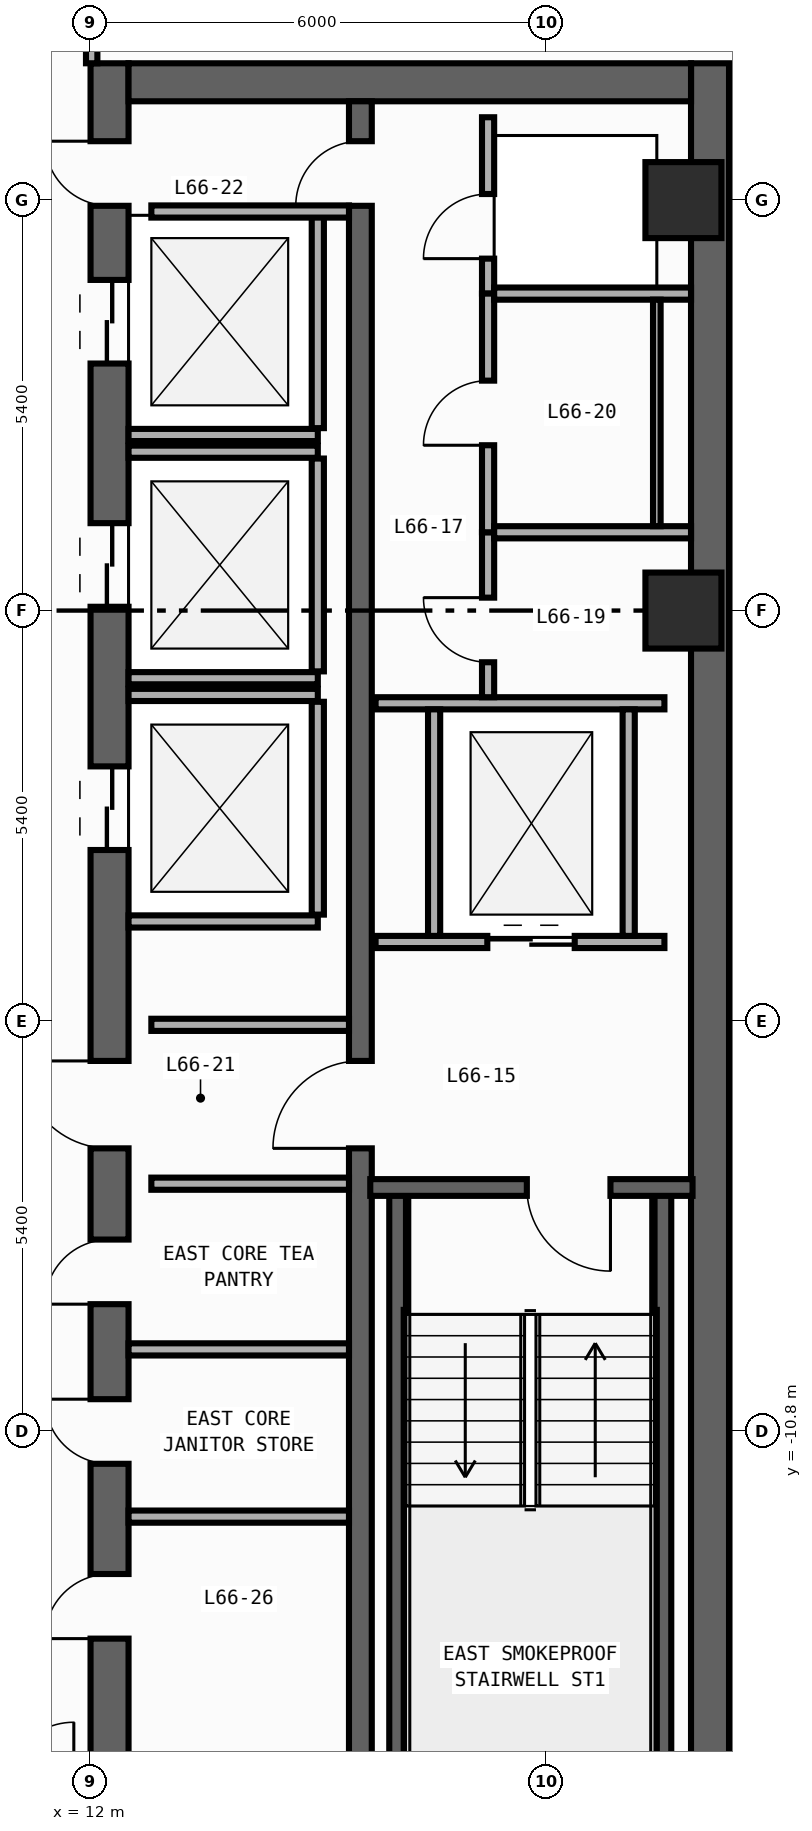
"""IFC4 building model, lengths in metres.
Left out: names, types, materials, properties, quantities, classifications, styles, units other than length and angle.
Written with IfcOpenShell. Run it as: python <this file> out.ifc"""

import sys

from ifc_helpers import new_model, si_unit, direction, frame, frame_2d, origin, origin_2d, place, context, subcontext, project, spatial, rectangle, circle, extrude, element, fill, save


model = new_model("IFC4")
c1 = context("Model", 3, precision=1e-05, world=origin(), true_north=direction((0.0, 1.0)))
c2 = subcontext(c1, "Body", "Model", "MODEL_VIEW")
j1 = project(units=[si_unit("LENGTHUNIT", "METRE"), si_unit("PLANEANGLEUNIT", "RADIAN")], contexts=[c1])
p1 = place(None, origin())
s1 = spatial("IfcSite", under=j1, at=p1, CompositionType="ELEMENT")
p2 = place(p1, origin())
s2 = spatial("IfcBuilding", under=s1, at=p2, CompositionType="ELEMENT")
p3 = place(p2, frame((0.0, 0.0, 277.6)))
s3 = spatial("IfcBuildingStorey", under=s2, at=p3, CompositionType="ELEMENT", Elevation=277.6)
p4 = place(p3, frame((12.25, -19.8, 0.0), z_axis=(0.0, 0.0, 1.0), x_axis=(0.0, 1.0, 0.0)))
e1 = element("IfcWall", 1, at=p4, inside=s3, PredefinedType="SHEAR", context=c2, shape_type="SweptSolid", body=[
    extrude(rectangle(XDim=27.0, YDim=0.5, at=frame_2d((13.5, 0.0))), origin(), (0.0, 0.0, 1.0), 3.54),
])
p5 = place(p4, frame((23.05, 0.0, 0.0)))
e2 = element("IfcOpeningElement", 2, at=p5, cuts=e1, PredefinedType="OPENING", context=c2, shape_type="SweptSolid", body=[
    extrude(rectangle(XDim=1.1, YDim=2.2, at=frame_2d((0.55, 1.1))), frame((0.0, 0.26, 0.0), z_axis=(0.0, -1.0, 0.0), x_axis=(1.0, 0.0, 0.0)), (0.0, 0.0, 1.0), 0.52),
])
p6 = place(p4, frame((19.85, 0.0, 0.0)))
e3 = element("IfcOpeningElement", 3, at=p6, cuts=e1, PredefinedType="OPENING", context=c2, shape_type="SweptSolid", body=[
    extrude(rectangle(XDim=1.1, YDim=2.2, at=frame_2d((0.55, 1.1))), frame((0.0, 0.26, 0.0), z_axis=(0.0, -1.0, 0.0), x_axis=(1.0, 0.0, 0.0)), (0.0, 0.0, 1.0), 0.52),
])
p7 = place(p4, frame((16.65, 0.0, 0.0)))
e4 = element("IfcOpeningElement", 4, at=p7, cuts=e1, PredefinedType="OPENING", context=c2, shape_type="SweptSolid", body=[
    extrude(rectangle(XDim=1.1, YDim=2.2, at=frame_2d((0.55, 1.1))), frame((0.0, 0.26, 0.0), z_axis=(0.0, -1.0, 0.0), x_axis=(1.0, 0.0, 0.0)), (0.0, 0.0, 1.0), 0.52),
])
p8 = place(p4, frame((6.275, 0.0, 0.0)))
e5 = element("IfcOpeningElement", 5, at=p8, cuts=e1, PredefinedType="OPENING", context=c2, shape_type="SweptSolid", body=[
    extrude(rectangle(XDim=0.85, YDim=2.1, at=frame_2d((0.425, 1.05))), frame((0.0, 0.26, 0.0), z_axis=(0.0, -1.0, 0.0), x_axis=(1.0, 0.0, 0.0)), (0.0, 0.0, 1.0), 0.52),
])
p9 = place(p4, frame((8.575, 0.0, 0.0)))
e6 = element("IfcOpeningElement", 6, at=p9, cuts=e1, PredefinedType="OPENING", context=c2, shape_type="SweptSolid", body=[
    extrude(rectangle(XDim=0.85, YDim=2.1, at=frame_2d((0.425, 1.05))), frame((0.0, 0.26, 0.0), z_axis=(0.0, -1.0, 0.0), x_axis=(1.0, 0.0, 0.0)), (0.0, 0.0, 1.0), 0.52),
])
p10 = place(p4, frame((10.675, 0.0, 0.0)))
e7 = element("IfcOpeningElement", 7, at=p10, cuts=e1, PredefinedType="OPENING", context=c2, shape_type="SweptSolid", body=[
    extrude(rectangle(XDim=0.85, YDim=2.1, at=frame_2d((0.425, 1.05))), frame((0.0, 0.26, 0.0), z_axis=(0.0, -1.0, 0.0), x_axis=(1.0, 0.0, 0.0)), (0.0, 0.0, 1.0), 0.52),
])
p11 = place(p4, frame((12.725, 0.0, 0.0)))
e8 = element("IfcOpeningElement", 8, at=p11, cuts=e1, PredefinedType="OPENING", context=c2, shape_type="SweptSolid", body=[
    extrude(rectangle(XDim=1.15, YDim=2.2, at=frame_2d((0.575, 1.1))), frame((0.0, 0.26, 0.0), z_axis=(0.0, -1.0, 0.0), x_axis=(1.0, 0.0, 0.0)), (0.0, 0.0, 1.0), 0.52),
])
p12 = place(p4, frame((25.125, 0.0, 0.0)))
e9 = element("IfcOpeningElement", 9, at=p12, cuts=e1, PredefinedType="OPENING", context=c2, shape_type="SweptSolid", body=[
    extrude(rectangle(XDim=0.85, YDim=2.1, at=frame_2d((0.425, 1.05))), frame((0.0, 0.26, 0.0), z_axis=(0.0, -1.0, 0.0), x_axis=(1.0, 0.0, 0.0)), (0.0, 0.0, 1.0), 0.52),
])
p13 = place(p3, frame((20.15, -19.8, 0.0), z_axis=(0.0, 0.0, 1.0), x_axis=(0.0, 1.0, 0.0)))
e10 = element("IfcWall", 10, at=p13, inside=s3, PredefinedType="SHEAR", context=c2, shape_type="SweptSolid", body=[
    extrude(rectangle(XDim=27.0, YDim=0.5, at=frame_2d((13.5, 0.0))), origin(), (0.0, 0.0, 1.0), 3.54),
])
p14 = place(p3, frame((12.5, 6.95, 0.0), z_axis=(0.0, 0.0, 1.0), x_axis=(1.0, 0.0, 0.0)))
e11 = element("IfcWall", 11, at=p14, inside=s3, PredefinedType="SHEAR", context=c2, shape_type="SweptSolid", body=[
    extrude(rectangle(XDim=7.4, YDim=0.5, at=frame_2d((3.7, 0.0))), origin(), (0.0, 0.0, 1.0), 3.54),
])
p15 = place(p3, frame((15.55, -19.3, 0.0), z_axis=(0.0, 0.0, 1.0), x_axis=(0.0, 1.0, 0.0)))
e12 = element("IfcWall", 12, at=p15, inside=s3, PredefinedType="SHEAR", context=c2, shape_type="SweptSolid", body=[
    extrude(rectangle(XDim=26.0, YDim=0.3, at=frame_2d((13.0, 0.0))), origin(), (0.0, 0.0, 1.0), 3.54),
])
p16 = place(p15, frame((12.225, 0.0, 0.0)))
e13 = element("IfcOpeningElement", 13, at=p16, cuts=e12, PredefinedType="OPENING", context=c2, shape_type="SweptSolid", body=[
    extrude(rectangle(XDim=1.15, YDim=2.2, at=frame_2d((0.575, 1.1))), frame((0.0, 0.16, 0.0), z_axis=(0.0, -1.0, 0.0), x_axis=(1.0, 0.0, 0.0)), (0.0, 0.0, 1.0), 0.32),
])
p17 = place(p15, frame((24.625, 0.0, 0.0)))
e14 = element("IfcOpeningElement", 14, at=p17, cuts=e12, PredefinedType="OPENING", context=c2, shape_type="SweptSolid", body=[
    extrude(rectangle(XDim=0.85, YDim=2.1, at=frame_2d((0.425, 1.05))), frame((0.0, 0.16, 0.0), z_axis=(0.0, -1.0, 0.0), x_axis=(1.0, 0.0, 0.0)), (0.0, 0.0, 1.0), 0.32),
])
for number, where, z_axis, x_axis in (
    (15, (16.04, -19.01, 0.0), (0.0, 0.0, 1.0), (0.0, 1.0, 0.0)),
    (16, (19.53, -19.01, 0.0), (0.0, 0.0, 1.0), (0.0, 1.0, 0.0)),
):
    element("IfcWall", number, at=place(p3, frame(where, z_axis=z_axis, x_axis=x_axis)), inside=s3, PredefinedType="SHEAR", context=c2, shape_type="SweptSolid", body=[
        extrude(rectangle(XDim=11.42, YDim=0.22, at=frame_2d((5.71, 0.0))), origin(), (0.0, 0.0, 1.0), 3.54),
    ])
p18 = place(p3, frame((19.92, -7.59, 0.0), z_axis=(0.0, 0.0, 1.0), x_axis=(-1.0, 0.0, 0.0)))
e17 = element("IfcWall", 17, at=p18, inside=s3, PredefinedType="SHEAR", context=c2, shape_type="SweptSolid", body=[
    extrude(rectangle(XDim=4.24, YDim=0.22, at=frame_2d((2.12, 0.0))), origin(), (0.0, 0.0, 1.0), 3.54),
])
p19 = place(p18, frame((1.08, 0.0, 0.0)))
e18 = element("IfcOpeningElement", 18, at=p19, cuts=e17, PredefinedType="OPENING", context=c2, shape_type="SweptSolid", body=[
    extrude(rectangle(XDim=1.1, YDim=2.2, at=frame_2d((0.55, 1.1))), frame((0.0, 0.12, 0.0), z_axis=(0.0, -1.0, 0.0), x_axis=(1.0, 0.0, 0.0)), (0.0, 0.0, 1.0), 0.24),
])
for number, where, z_axis, x_axis in (
    (19, (19.8, 0.0, 0.0), (0.0, 0.0, 1.0), (1.0, 0.0, 0.0)),
    (20, (19.8, 5.4, 0.0), (0.0, 0.0, 1.0), (1.0, 0.0, 0.0)),
):
    element("IfcColumn", number, at=place(p3, frame(where, z_axis=z_axis, x_axis=x_axis)), inside=s3, PredefinedType="COLUMN", context=c2, shape_type="SweptSolid", body=[
        extrude(circle(Radius=0.5, at=origin_2d()), origin(), (0.0, 0.0, 1.0), 3.8),
    ])
p20 = place(p3, frame((12.5, 2.31, 0.0), z_axis=(0.0, 0.0, 1.0), x_axis=(1.0, 0.0, 0.0)))
e21 = element("IfcWall", 21, at=p20, inside=s3, PredefinedType="STANDARD", context=c2, shape_type="SweptSolid", body=[
    extrude(rectangle(XDim=2.49, YDim=0.16, at=frame_2d((1.245, 0.0))), origin(), (0.0, 0.0, 1.0), 3.54),
])
p21 = place(p3, frame((14.99, 2.4, 0.0), z_axis=(0.0, 0.0, 1.0), x_axis=(0.0, 1.0, 0.0)))
e22 = element("IfcWall", 22, at=p21, inside=s3, PredefinedType="STANDARD", context=c2, shape_type="SweptSolid", body=[
    extrude(rectangle(XDim=2.8, YDim=0.16, at=frame_2d((1.4, 0.0))), origin(), (0.0, 0.0, 1.0), 3.54),
])
for number, where, z_axis, x_axis in (
    (23, (12.5, -0.89, 0.0), (0.0, 0.0, 1.0), (1.0, 0.0, 0.0)),
    (24, (12.5, 2.09, 0.0), (0.0, 0.0, 1.0), (1.0, 0.0, 0.0)),
):
    element("IfcWall", number, at=place(p3, frame(where, z_axis=z_axis, x_axis=x_axis)), inside=s3, PredefinedType="STANDARD", context=c2, shape_type="SweptSolid", body=[
        extrude(rectangle(XDim=2.49, YDim=0.16, at=frame_2d((1.245, 0.0))), origin(), (0.0, 0.0, 1.0), 3.54),
    ])
p22 = place(p3, frame((14.99, -0.8, 0.0), z_axis=(0.0, 0.0, 1.0), x_axis=(0.0, 1.0, 0.0)))
e25 = element("IfcWall", 25, at=p22, inside=s3, PredefinedType="STANDARD", context=c2, shape_type="SweptSolid", body=[
    extrude(rectangle(XDim=2.8, YDim=0.16, at=frame_2d((1.4, 0.0))), origin(), (0.0, 0.0, 1.0), 3.54),
])
for number, where, z_axis, x_axis in (
    (26, (12.5, -4.09, 0.0), (0.0, 0.0, 1.0), (1.0, 0.0, 0.0)),
    (27, (12.5, -1.11, 0.0), (0.0, 0.0, 1.0), (1.0, 0.0, 0.0)),
):
    element("IfcWall", number, at=place(p3, frame(where, z_axis=z_axis, x_axis=x_axis)), inside=s3, PredefinedType="STANDARD", context=c2, shape_type="SweptSolid", body=[
        extrude(rectangle(XDim=2.49, YDim=0.16, at=frame_2d((1.245, 0.0))), origin(), (0.0, 0.0, 1.0), 3.54),
    ])
p23 = place(p3, frame((14.99, -4.0, 0.0), z_axis=(0.0, 0.0, 1.0), x_axis=(0.0, 1.0, 0.0)))
e28 = element("IfcWall", 28, at=p23, inside=s3, PredefinedType="STANDARD", context=c2, shape_type="SweptSolid", body=[
    extrude(rectangle(XDim=2.8, YDim=0.16, at=frame_2d((1.4, 0.0))), origin(), (0.0, 0.0, 1.0), 3.54),
])
p24 = place(p3, frame((15.75, -4.36, 0.0), z_axis=(0.0, 0.0, 1.0), x_axis=(1.0, 0.0, 0.0)))
e29 = element("IfcWall", 29, at=p24, inside=s3, PredefinedType="STANDARD", context=c2, shape_type="SweptSolid", body=[
    extrude(rectangle(XDim=3.8, YDim=0.16, at=frame_2d((1.9, 0.0))), origin(), (0.0, 0.0, 1.0), 3.54),
])
p25 = place(p24, frame((1.47, 0.0, 0.0)))
e30 = element("IfcOpeningElement", 30, at=p25, cuts=e29, PredefinedType="OPENING", context=c2, shape_type="SweptSolid", body=[
    extrude(rectangle(XDim=1.15, YDim=2.2, at=frame_2d((0.575, 1.1))), frame((0.0, 0.09, 0.0), z_axis=(0.0, -1.0, 0.0), x_axis=(1.0, 0.0, 0.0)), (0.0, 0.0, 1.0), 0.18),
])
p26 = place(p3, frame((15.75, -1.22, 0.0), z_axis=(0.0, 0.0, 1.0), x_axis=(1.0, 0.0, 0.0)))
e31 = element("IfcWall", 31, at=p26, inside=s3, PredefinedType="STANDARD", context=c2, shape_type="SweptSolid", body=[
    extrude(rectangle(XDim=3.8, YDim=0.16, at=frame_2d((1.9, 0.0))), origin(), (0.0, 0.0, 1.0), 3.54),
])
for number, where, z_axis, x_axis in (
    (32, (16.52, -4.28, 0.0), (0.0, 0.0, 1.0), (0.0, 1.0, 0.0)),
    (33, (19.08, -4.28, 0.0), (0.0, 0.0, 1.0), (0.0, 1.0, 0.0)),
):
    element("IfcWall", number, at=place(p3, frame(where, z_axis=z_axis, x_axis=x_axis)), inside=s3, PredefinedType="STANDARD", context=c2, shape_type="SweptSolid", body=[
        extrude(rectangle(XDim=2.98, YDim=0.16, at=frame_2d((1.49, 0.0))), origin(), (0.0, 0.0, 1.0), 3.54),
    ])
for number, where, z_axis, x_axis in (
    (34, (12.8, -5.45, 0.0), (0.0, 0.0, 1.0), (1.0, 0.0, 0.0)),
    (35, (12.8, -7.54, 0.0), (0.0, 0.0, 1.0), (1.0, 0.0, 0.0)),
    (36, (12.8, 5.25, 0.0), (0.0, 0.0, 1.0), (1.0, 0.0, 0.0)),
):
    element("IfcWall", number, at=place(p3, frame(where, z_axis=z_axis, x_axis=x_axis)), inside=s3, PredefinedType="STANDARD", context=c2, shape_type="SweptSolid", body=[
        extrude(rectangle(XDim=2.6, YDim=0.16, at=frame_2d((1.3, 0.0))), origin(), (0.0, 0.0, 1.0), 3.54),
    ])
p27 = place(p3, frame((17.23, 4.17, 0.0), z_axis=(0.0, 0.0, 1.0), x_axis=(0.0, 1.0, 0.0)))
e37 = element("IfcWall", 37, at=p27, inside=s3, PredefinedType="PARTITIONING", context=c2, shape_type="SweptSolid", body=[
    extrude(rectangle(XDim=2.32, YDim=0.16, at=frame_2d((1.16, 0.0))), origin(), (0.0, 0.0, 1.0), 3.54),
])
p28 = place(p27, frame((0.46, 0.0, 0.0)))
e38 = element("IfcOpeningElement", 38, at=p28, cuts=e37, PredefinedType="OPENING", context=c2, shape_type="SweptSolid", body=[
    extrude(rectangle(XDim=0.85, YDim=2.1, at=frame_2d((0.425, 1.05))), frame((0.0, 0.09, 0.0), z_axis=(0.0, -1.0, 0.0), x_axis=(1.0, 0.0, 0.0)), (0.0, 0.0, 1.0), 0.18),
])
p29 = place(p3, frame((17.23, -1.14, 0.0), z_axis=(0.0, 0.0, 1.0), x_axis=(0.0, 1.0, 0.0)))
e39 = element("IfcWall", 39, at=p29, inside=s3, PredefinedType="PARTITIONING", context=c2, shape_type="SweptSolid", body=[
    extrude(rectangle(XDim=2.17, YDim=0.16, at=frame_2d((1.085, 0.0))), origin(), (0.0, 0.0, 1.0), 3.54),
])
p30 = place(p29, frame((0.46, 0.0, 0.0)))
e40 = element("IfcOpeningElement", 40, at=p30, cuts=e39, PredefinedType="OPENING", context=c2, shape_type="SweptSolid", body=[
    extrude(rectangle(XDim=0.85, YDim=2.1, at=frame_2d((0.425, 1.05))), frame((0.0, 0.09, 0.0), z_axis=(0.0, -1.0, 0.0), x_axis=(1.0, 0.0, 0.0)), (0.0, 0.0, 1.0), 0.18),
])
p31 = place(p3, frame((17.23, 1.03, 0.0), z_axis=(0.0, 0.0, 1.0), x_axis=(0.0, 1.0, 0.0)))
e41 = element("IfcWall", 41, at=p31, inside=s3, PredefinedType="PARTITIONING", context=c2, shape_type="SweptSolid", body=[
    extrude(rectangle(XDim=3.14, YDim=0.16, at=frame_2d((1.57, 0.0))), origin(), (0.0, 0.0, 1.0), 3.54),
])
p32 = place(p31, frame((1.145, 0.0, 0.0)))
e42 = element("IfcOpeningElement", 42, at=p32, cuts=e41, PredefinedType="OPENING", context=c2, shape_type="SweptSolid", body=[
    extrude(rectangle(XDim=0.85, YDim=2.1, at=frame_2d((0.425, 1.05))), frame((0.0, 0.09, 0.0), z_axis=(0.0, -1.0, 0.0), x_axis=(1.0, 0.0, 0.0)), (0.0, 0.0, 1.0), 0.18),
])
for number, where, z_axis, x_axis in (
    (43, (17.31, 4.17, 0.0), (0.0, 0.0, 1.0), (1.0, 0.0, 0.0)),
    (44, (17.31, 1.03, 0.0), (0.0, 0.0, 1.0), (1.0, 0.0, 0.0)),
):
    element("IfcWall", number, at=place(p3, frame(where, z_axis=z_axis, x_axis=x_axis)), inside=s3, PredefinedType="PARTITIONING", context=c2, shape_type="SweptSolid", body=[
        extrude(rectangle(XDim=2.59, YDim=0.16, at=frame_2d((1.295, 0.0))), origin(), (0.0, 0.0, 1.0), 3.54),
    ])
for number, where, z_axis, x_axis in (
    (45, (12.5, -11.92, 0.0), (0.0, 0.0, 1.0), (1.0, 0.0, 0.0)),
    (46, (12.5, -9.72, 0.0), (0.0, 0.0, 1.0), (1.0, 0.0, 0.0)),
):
    element("IfcWall", number, at=place(p3, frame(where, z_axis=z_axis, x_axis=x_axis)), inside=s3, PredefinedType="PARTITIONING", context=c2, shape_type="SweptSolid", body=[
        extrude(rectangle(XDim=2.9, YDim=0.16, at=frame_2d((1.45, 0.0))), origin(), (0.0, 0.0, 1.0), 3.54),
    ])
p33 = place(p3, frame((12.015, 7.2, 0.0), z_axis=(0.0, 0.0, 1.0), x_axis=(0.0, 1.0, 0.0)))
e47 = element("IfcWall", 47, at=p33, inside=s3, PredefinedType="PARTITIONING", context=c2, shape_type="SweptSolid", body=[
    extrude(rectangle(XDim=6.68, YDim=0.15, at=frame_2d((3.34, 0.0))), origin(), (0.0, 0.0, 1.0), 3.54),
])
p34 = place(p33, frame((0.67, 0.0, 0.0)))
e48 = element("IfcOpeningElement", 48, at=p34, cuts=e47, PredefinedType="OPENING", context=c2, shape_type="SweptSolid", body=[
    extrude(rectangle(XDim=0.9, YDim=2.15, at=frame_2d((0.45, 1.075))), frame((0.0, 0.085, 0.0), z_axis=(0.0, -1.0, 0.0), x_axis=(1.0, 0.0, 0.0)), (0.0, 0.0, 1.0), 0.17),
])
p35 = place(p3, frame((19.45, 4.09, 0.0), z_axis=(0.0, 0.0, 1.0), x_axis=(0.0, -1.0, 0.0)))
e49 = element("IfcWall", 49, at=p35, inside=s3, PredefinedType="PARTITIONING", context=c2, shape_type="SweptSolid", body=[
    extrude(rectangle(XDim=2.98, YDim=0.1, at=frame_2d((1.49, 0.0))), origin(), (0.0, 0.0, 1.0), 3.54),
])
p36 = place(p19, origin())
e50 = element("IfcDoor", 50, at=p36, inside=s3, OperationType="SINGLE_SWING_LEFT", PredefinedType="DOOR", context=c2, shape_type="SweptSolid", body=[
    extrude(rectangle(XDim=1.1, YDim=2.2, at=frame_2d((0.55, 1.1))), frame((0.0, 0.025, 0.0), z_axis=(0.0, -1.0, 0.0), x_axis=(1.0, 0.0, 0.0)), (0.0, 0.0, 1.0), 0.05),
])
fill(e18, e50)
p37 = place(p5, origin())
e51 = element("IfcDoor", 51, at=p37, inside=s3, OperationType="DOUBLE_DOOR_SLIDING", PredefinedType="DOOR", context=c2, shape_type="SweptSolid", body=[
    extrude(rectangle(XDim=1.1, YDim=2.2, at=frame_2d((0.55, 1.1))), frame((0.0, 0.025, 0.0), z_axis=(0.0, -1.0, 0.0), x_axis=(1.0, 0.0, 0.0)), (0.0, 0.0, 1.0), 0.05),
])
fill(e2, e51)
p38 = place(p6, origin())
e52 = element("IfcDoor", 52, at=p38, inside=s3, OperationType="DOUBLE_DOOR_SLIDING", PredefinedType="DOOR", context=c2, shape_type="SweptSolid", body=[
    extrude(rectangle(XDim=1.1, YDim=2.2, at=frame_2d((0.55, 1.1))), frame((0.0, 0.025, 0.0), z_axis=(0.0, -1.0, 0.0), x_axis=(1.0, 0.0, 0.0)), (0.0, 0.0, 1.0), 0.05),
])
fill(e3, e52)
p39 = place(p7, origin())
e53 = element("IfcDoor", 53, at=p39, inside=s3, OperationType="DOUBLE_DOOR_SLIDING", PredefinedType="DOOR", context=c2, shape_type="SweptSolid", body=[
    extrude(rectangle(XDim=1.1, YDim=2.2, at=frame_2d((0.55, 1.1))), frame((0.0, 0.025, 0.0), z_axis=(0.0, -1.0, 0.0), x_axis=(1.0, 0.0, 0.0)), (0.0, 0.0, 1.0), 0.05),
])
fill(e4, e53)
p40 = place(p8, origin())
e54 = element("IfcDoor", 54, at=p40, inside=s3, OperationType="SINGLE_SWING_LEFT", PredefinedType="DOOR", context=c2, shape_type="SweptSolid", body=[
    extrude(rectangle(XDim=0.85, YDim=2.1, at=frame_2d((0.425, 1.05))), frame((0.0, 0.025, 0.0), z_axis=(0.0, -1.0, 0.0), x_axis=(1.0, 0.0, 0.0)), (0.0, 0.0, 1.0), 0.05),
])
fill(e5, e54)
p41 = place(p9, origin())
e55 = element("IfcDoor", 55, at=p41, inside=s3, OperationType="SINGLE_SWING_RIGHT", PredefinedType="DOOR", context=c2, shape_type="SweptSolid", body=[
    extrude(rectangle(XDim=0.85, YDim=2.1, at=frame_2d((0.425, 1.05))), frame((0.0, 0.025, 0.0), z_axis=(0.0, -1.0, 0.0), x_axis=(1.0, 0.0, 0.0)), (0.0, 0.0, 1.0), 0.05),
])
fill(e6, e55)
p42 = place(p10, origin())
e56 = element("IfcDoor", 56, at=p42, inside=s3, OperationType="SINGLE_SWING_LEFT", PredefinedType="DOOR", context=c2, shape_type="SweptSolid", body=[
    extrude(rectangle(XDim=0.85, YDim=2.1, at=frame_2d((0.425, 1.05))), frame((0.0, 0.025, 0.0), z_axis=(0.0, -1.0, 0.0), x_axis=(1.0, 0.0, 0.0)), (0.0, 0.0, 1.0), 0.05),
])
fill(e7, e56)
p43 = place(p11, origin())
e57 = element("IfcDoor", 57, at=p43, inside=s3, OperationType="SINGLE_SWING_RIGHT", PredefinedType="DOOR", context=c2, shape_type="SweptSolid", body=[
    extrude(rectangle(XDim=1.15, YDim=2.2, at=frame_2d((0.575, 1.1))), frame((0.0, 0.025, 0.0), z_axis=(0.0, -1.0, 0.0), x_axis=(1.0, 0.0, 0.0)), (0.0, 0.0, 1.0), 0.05),
])
fill(e8, e57)
p44 = place(p16, origin())
e58 = element("IfcDoor", 58, at=p44, inside=s3, OperationType="SINGLE_SWING_LEFT", PredefinedType="DOOR", context=c2, shape_type="SweptSolid", body=[
    extrude(rectangle(XDim=1.15, YDim=2.2, at=frame_2d((0.575, 1.1))), frame((0.0, 0.025, 0.0), z_axis=(0.0, -1.0, 0.0), x_axis=(1.0, 0.0, 0.0)), (0.0, 0.0, 1.0), 0.05),
])
fill(e13, e58)
p45 = place(p12, origin())
e59 = element("IfcDoor", 59, at=p45, inside=s3, OperationType="SINGLE_SWING_RIGHT", PredefinedType="DOOR", context=c2, shape_type="SweptSolid", body=[
    extrude(rectangle(XDim=0.85, YDim=2.1, at=frame_2d((0.425, 1.05))), frame((0.0, 0.025, 0.0), z_axis=(0.0, -1.0, 0.0), x_axis=(1.0, 0.0, 0.0)), (0.0, 0.0, 1.0), 0.05),
])
fill(e9, e59)
p46 = place(p17, origin())
e60 = element("IfcDoor", 60, at=p46, inside=s3, OperationType="SINGLE_SWING_LEFT", PredefinedType="DOOR", context=c2, shape_type="SweptSolid", body=[
    extrude(rectangle(XDim=0.85, YDim=2.1, at=frame_2d((0.425, 1.05))), frame((0.0, 0.025, 0.0), z_axis=(0.0, -1.0, 0.0), x_axis=(1.0, 0.0, 0.0)), (0.0, 0.0, 1.0), 0.05),
])
fill(e14, e60)
p47 = place(p25, origin())
e61 = element("IfcDoor", 61, at=p47, inside=s3, OperationType="DOUBLE_DOOR_SLIDING", PredefinedType="DOOR", context=c2, shape_type="SweptSolid", body=[
    extrude(rectangle(XDim=1.15, YDim=2.2, at=frame_2d((0.575, 1.1))), frame((0.0, 0.025, 0.0), z_axis=(0.0, -1.0, 0.0), x_axis=(1.0, 0.0, 0.0)), (0.0, 0.0, 1.0), 0.05),
])
fill(e30, e61)
p48 = place(p28, origin())
e62 = element("IfcDoor", 62, at=p48, inside=s3, OperationType="SINGLE_SWING_LEFT", PredefinedType="DOOR", context=c2, shape_type="SweptSolid", body=[
    extrude(rectangle(XDim=0.85, YDim=2.1, at=frame_2d((0.425, 1.05))), frame((0.0, 0.025, 0.0), z_axis=(0.0, -1.0, 0.0), x_axis=(1.0, 0.0, 0.0)), (0.0, 0.0, 1.0), 0.05),
])
fill(e38, e62)
p49 = place(p30, origin())
e63 = element("IfcDoor", 63, at=p49, inside=s3, OperationType="SINGLE_SWING_RIGHT", PredefinedType="DOOR", context=c2, shape_type="SweptSolid", body=[
    extrude(rectangle(XDim=0.85, YDim=2.1, at=frame_2d((0.425, 1.05))), frame((0.0, 0.025, 0.0), z_axis=(0.0, -1.0, 0.0), x_axis=(1.0, 0.0, 0.0)), (0.0, 0.0, 1.0), 0.05),
])
fill(e40, e63)
p50 = place(p32, origin())
e64 = element("IfcDoor", 64, at=p50, inside=s3, OperationType="SINGLE_SWING_LEFT", PredefinedType="DOOR", context=c2, shape_type="SweptSolid", body=[
    extrude(rectangle(XDim=0.85, YDim=2.1, at=frame_2d((0.425, 1.05))), frame((0.0, 0.025, 0.0), z_axis=(0.0, -1.0, 0.0), x_axis=(1.0, 0.0, 0.0)), (0.0, 0.0, 1.0), 0.05),
])
fill(e42, e64)
save(model, sys.argv[1])
